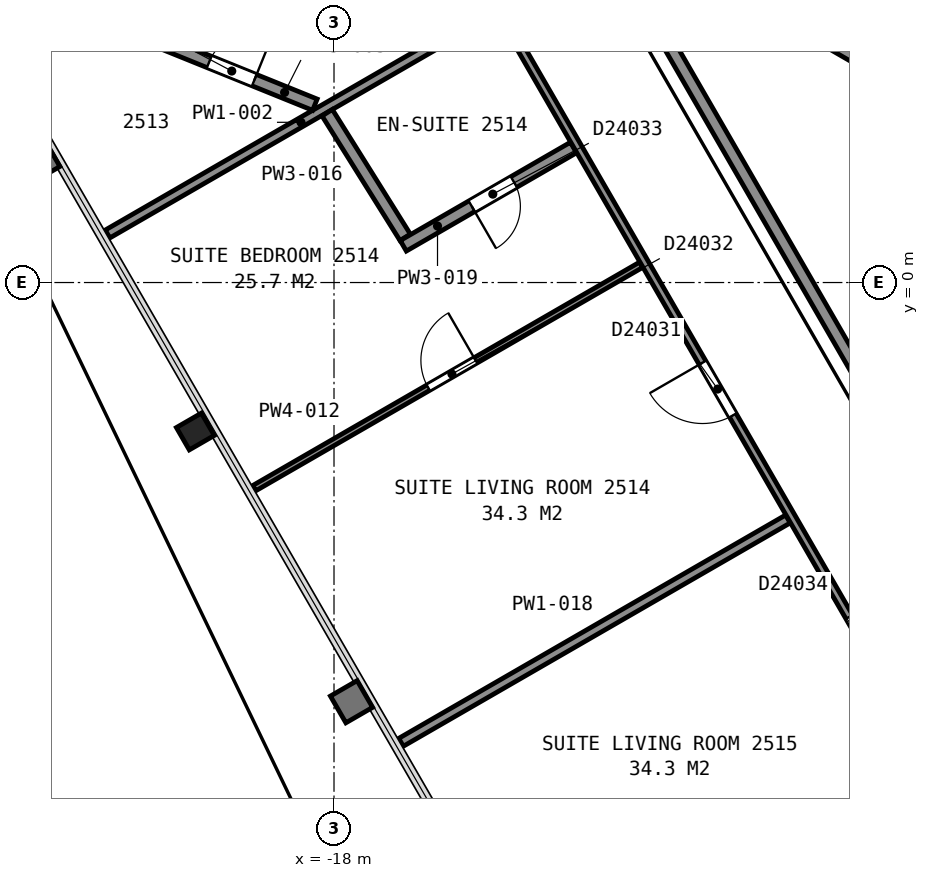
"""IFC4 building model, lengths in metres.
Left out: names, types, materials, properties, quantities, classifications, styles, units other than length and angle.
Written with IfcOpenShell. Run it as: python <this file> out.ifc"""

import sys

from ifc_helpers import new_model, si_unit, direction, frame, frame_2d, origin, origin_2d, place, context, subcontext, project, spatial, rectangle, i_section, extrude, element, fill, save


model = new_model("IFC4")
c1 = context("Model", 3, precision=1e-05, world=origin(), true_north=direction((0.0, 1.0)))
c2 = subcontext(c1, "Body", "Model", "MODEL_VIEW")
j1 = project(units=[si_unit("LENGTHUNIT", "METRE"), si_unit("PLANEANGLEUNIT", "RADIAN")], contexts=[c1])
p1 = place(None, origin())
s1 = spatial("IfcSite", under=j1, at=p1, CompositionType="ELEMENT")
p2 = place(p1, origin())
s2 = spatial("IfcBuilding", under=s1, at=p2, CompositionType="ELEMENT")
p3 = place(p2, frame((0.0, 0.0, 107.2)))
s3 = spatial("IfcBuildingStorey", under=s2, at=p3, CompositionType="ELEMENT", Elevation=107.2)
p4 = place(p3, frame((-20.28, -2.45, 0.0), z_axis=(0.0, 0.0, 1.0), x_axis=(-0.5, 0.866025403784, 0.0)))
e1 = element("IfcColumn", 1, at=p4, inside=s3, PredefinedType="COLUMN", context=c2, shape_type="SweptSolid", body=[
    extrude(i_section(OverallWidth=0.424, OverallDepth=0.475, WebThickness=0.048, FlangeThickness=0.077, FilletRadius=0.015, at=origin_2d()), origin(), (0.0, 0.0, 1.0), 3.6),
])
p5 = place(p3, frame((-7.678, 2.701, 0.0), z_axis=(0.0, 0.0, 1.0), x_axis=(-0.866026010844, 0.49999894854, 0.0)))
e2 = element("IfcWall", 2, at=p5, inside=s3, PredefinedType="PARTITIONING", context=c2, shape_type="SweptSolid", body=[
    extrude(rectangle(XDim=12.0, YDim=0.2, at=frame_2d((6.0, 0.0))), origin(), (0.0, 0.0, 1.0), 3.35),
])
p6 = place(p3, frame((-13.664, 5.946, 0.0), z_axis=(0.0, 0.0, 1.0), x_axis=(0.499994327219, -0.866028678941, 0.0)))
e3 = element("IfcWall", 3, at=p6, inside=s3, PredefinedType="PARTITIONING", context=c2, shape_type="SweptSolid", body=[
    extrude(rectangle(XDim=23.968, YDim=0.2, at=frame_2d((11.984, 0.0))), origin(), (0.0, 0.0, 1.0), 3.35),
])
p7 = place(p3, frame((-21.725, 0.798, 0.0), z_axis=(0.0, 0.0, 1.0), x_axis=(0.866003534372, 0.50003787702, 0.0)))
e4 = element("IfcWall", 4, at=p7, inside=s3, PredefinedType="PARTITIONING", context=c2, shape_type="SweptSolid", body=[
    extrude(rectangle(XDim=7.348, YDim=0.15, at=frame_2d((3.674, 0.0))), origin(), (0.0, 0.0, 1.0), 2.613),
])
p8 = place(p3, frame((-21.021, 4.02, 0.0), z_axis=(0.0, 0.0, 1.0), x_axis=(0.927010502524, -0.375035369278, 0.0)))
e5 = element("IfcWall", 5, at=p8, inside=s3, PredefinedType="PARTITIONING", context=c2, shape_type="SweptSolid", body=[
    extrude(rectangle(XDim=2.92, YDim=0.2, at=frame_2d((1.46, 0.0))), origin(), (0.0, 0.0, 1.0), 2.613),
])
p9 = place(p8, frame((1.045, 0.0, 0.0)))
e6 = element("IfcOpeningElement", 6, at=p9, cuts=e5, PredefinedType="OPENING", context=c2, shape_type="SweptSolid", body=[
    extrude(rectangle(XDim=0.8, YDim=2.1, at=frame_2d((0.4, 1.05))), frame((0.0, 0.11, 0.0), z_axis=(0.0, -1.0, 0.0), x_axis=(1.0, 0.0, 0.0)), (0.0, 0.0, 1.0), 0.22),
])
p10 = place(p3, frame((-19.311, -3.382, 0.0), z_axis=(0.0, 0.0, 1.0), x_axis=(0.865995225926, 0.500052265941, 0.0)))
e7 = element("IfcWall", 7, at=p10, inside=s3, PredefinedType="PARTITIONING", context=c2, shape_type="SweptSolid", body=[
    extrude(rectangle(XDim=7.347, YDim=0.1, at=frame_2d((3.674, 0.0))), origin(), (0.0, 0.0, 1.0), 2.613),
])
p11 = place(p10, frame((3.303, 0.0, 0.0)))
e8 = element("IfcOpeningElement", 8, at=p11, cuts=e7, PredefinedType="OPENING", context=c2, shape_type="SweptSolid", body=[
    extrude(rectangle(XDim=0.9, YDim=2.1, at=frame_2d((0.45, 1.05))), frame((0.0, 0.06, 0.0), z_axis=(0.0, -1.0, 0.0), x_axis=(1.0, 0.0, 0.0)), (0.0, 0.0, 1.0), 0.12),
])
p12 = place(p3, frame((-18.112, 2.793, 0.0), z_axis=(0.0, 0.0, 1.0), x_axis=(0.530334606404, -0.847788420097, 0.0)))
e9 = element("IfcWall", 9, at=p12, inside=s3, PredefinedType="PARTITIONING", context=c2, shape_type="SweptSolid", body=[
    extrude(rectangle(XDim=2.419, YDim=0.2, at=frame_2d((1.209, 0.0))), origin(), (0.0, 0.0, 1.0), 2.613),
])
p13 = place(p3, frame((-16.898, -7.562, 0.0), z_axis=(0.0, 0.0, 1.0), x_axis=(0.866055004685, 0.499948726231, 0.0)))
e10 = element("IfcWall", 10, at=p13, inside=s3, PredefinedType="PARTITIONING", context=c2, shape_type="SweptSolid", body=[
    extrude(rectangle(XDim=7.347, YDim=0.15, at=frame_2d((3.674, 0.0))), origin(), (0.0, 0.0, 1.0), 2.613),
])
p14 = place(p3, frame((-16.861, 0.604, 0.0), z_axis=(0.0, 0.0, 1.0), x_axis=(0.866003189247, 0.500038474733, 0.0)))
e11 = element("IfcWall", 11, at=p14, inside=s3, PredefinedType="PARTITIONING", context=c2, shape_type="SweptSolid", body=[
    extrude(rectangle(XDim=3.232, YDim=0.2, at=frame_2d((1.616, 0.0))), origin(), (0.0, 0.0, 1.0), 2.613),
])
p15 = place(p14, frame((1.3, 0.0, 0.0)))
e12 = element("IfcOpeningElement", 12, at=p15, cuts=e11, PredefinedType="OPENING", context=c2, shape_type="SweptSolid", body=[
    extrude(rectangle(XDim=0.8, YDim=2.1, at=frame_2d((0.4, 1.05))), frame((0.0, 0.11, 0.0), z_axis=(0.0, -1.0, 0.0), x_axis=(1.0, 0.0, 0.0)), (0.0, 0.0, 1.0), 0.22),
])
p16 = place(p3, frame((-3.756, -15.494, 0.0), z_axis=(0.0, 0.0, 1.0), x_axis=(-0.500027787016, 0.866009360349, 0.0)))
e13 = element("IfcWall", 13, at=p16, inside=s3, PredefinedType="PARTITIONING", context=c2, shape_type="SweptSolid", body=[
    extrude(rectangle(XDim=23.856, YDim=0.125, at=frame_2d((11.928, 0.0))), origin(), (0.0, 0.0, 1.0), 2.613),
])
p17 = place(p16, frame((15.368, 0.0, 0.0)))
e14 = element("IfcOpeningElement", 14, at=p17, cuts=e13, PredefinedType="OPENING", context=c2, shape_type="SweptSolid", body=[
    extrude(rectangle(XDim=1.0, YDim=2.1, at=frame_2d((0.5, 1.05))), frame((0.0, 0.073, 0.0), z_axis=(0.0, -1.0, 0.0), x_axis=(1.0, 0.0, 0.0)), (0.0, 0.0, 1.0), 0.145),
])
p18 = place(p16, frame((10.54, 0.0, 0.0)))
e15 = element("IfcOpeningElement", 15, at=p18, cuts=e13, PredefinedType="OPENING", context=c2, shape_type="SweptSolid", body=[
    extrude(rectangle(XDim=1.0, YDim=2.1, at=frame_2d((0.5, 1.05))), frame((0.0, 0.073, 0.0), z_axis=(0.0, -1.0, 0.0), x_axis=(1.0, 0.0, 0.0)), (0.0, 0.0, 1.0), 0.145),
])
p19 = place(p3, frame((-8.117, -8.066, 0.0), z_axis=(0.0, 0.0, 1.0), x_axis=(-0.866052324842, -0.499953368461, 0.0)))
e16 = element("IfcWall", 16, at=p19, inside=s3, PredefinedType="PARTITIONING", context=c2, shape_type="SweptSolid", body=[
    extrude(rectangle(XDim=7.352, YDim=0.1, at=frame_2d((3.676, 0.0))), origin(), (0.0, 0.0, 1.0), 2.613),
])
p20 = place(p19, frame((3.148, 0.0, 0.0)))
e17 = element("IfcOpeningElement", 17, at=p20, cuts=e16, PredefinedType="OPENING", context=c2, shape_type="SweptSolid", body=[
    extrude(rectangle(XDim=0.9, YDim=2.1, at=frame_2d((0.45, 1.05))), frame((0.0, 0.06, 0.0), z_axis=(0.0, -1.0, 0.0), x_axis=(1.0, 0.0, 0.0)), (0.0, 0.0, 1.0), 0.12),
])
p21 = place(p9, origin())
e18 = element("IfcDoor", 18, at=p21, inside=s3, OperationType="SINGLE_SWING_RIGHT", PredefinedType="DOOR", context=c2, shape_type="SweptSolid", body=[
    extrude(rectangle(XDim=0.8, YDim=2.1, at=frame_2d((0.4, 1.05))), frame((0.0, 0.025, 0.0), z_axis=(0.0, -1.0, 0.0), x_axis=(1.0, 0.0, 0.0)), (0.0, 0.0, 1.0), 0.05),
])
fill(e6, e18)
p22 = place(p11, origin())
e19 = element("IfcDoor", 19, at=p22, inside=s3, OperationType="SINGLE_SWING_RIGHT", PredefinedType="DOOR", context=c2, shape_type="SweptSolid", body=[
    extrude(rectangle(XDim=0.9, YDim=2.1, at=frame_2d((0.45, 1.05))), frame((0.0, 0.025, 0.0), z_axis=(0.0, -1.0, 0.0), x_axis=(1.0, 0.0, 0.0)), (0.0, 0.0, 1.0), 0.05),
])
fill(e8, e19)
p23 = place(p15, origin())
e20 = element("IfcDoor", 20, at=p23, inside=s3, OperationType="SINGLE_SWING_LEFT", PredefinedType="DOOR", context=c2, shape_type="SweptSolid", body=[
    extrude(rectangle(XDim=0.8, YDim=2.1, at=frame_2d((0.4, 1.05))), frame((0.0, 0.025, 0.0), z_axis=(0.0, -1.0, 0.0), x_axis=(1.0, 0.0, 0.0)), (0.0, 0.0, 1.0), 0.05),
])
fill(e12, e20)
p24 = place(p17, origin())
e21 = element("IfcDoor", 21, at=p24, inside=s3, OperationType="SINGLE_SWING_RIGHT", PredefinedType="DOOR", context=c2, shape_type="SweptSolid", body=[
    extrude(rectangle(XDim=1.0, YDim=2.1, at=frame_2d((0.5, 1.05))), frame((0.0, 0.025, 0.0), z_axis=(0.0, -1.0, 0.0), x_axis=(1.0, 0.0, 0.0)), (0.0, 0.0, 1.0), 0.05),
])
fill(e14, e21)
p25 = place(p18, origin())
e22 = element("IfcDoor", 22, at=p25, inside=s3, OperationType="SINGLE_SWING_LEFT", PredefinedType="DOOR", context=c2, shape_type="SweptSolid", body=[
    extrude(rectangle(XDim=1.0, YDim=2.1, at=frame_2d((0.5, 1.05))), frame((0.0, 0.025, 0.0), z_axis=(0.0, -1.0, 0.0), x_axis=(1.0, 0.0, 0.0)), (0.0, 0.0, 1.0), 0.05),
])
fill(e15, e22)
save(model, sys.argv[1])
